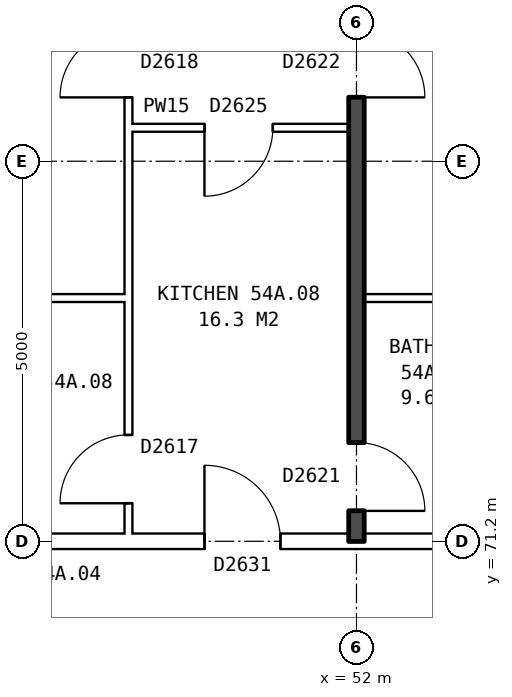
"""IFC4 building model, lengths in metres.
Left out: names, types, materials, properties, quantities, classifications, styles, units other than length and angle.
Written with IfcOpenShell. Run it as: python <this file> out.ifc"""

import sys

from ifc_helpers import new_model, si_unit, direction, frame, frame_2d, origin, place, context, subcontext, project, spatial, rectangle, extrude, element, fill, save


model = new_model("IFC4")
c1 = context("Model", 3, precision=1e-05, world=origin(), true_north=direction((0.0, 1.0)))
c2 = subcontext(c1, "Body", "Model", "MODEL_VIEW")
j1 = project(units=[si_unit("LENGTHUNIT", "METRE"), si_unit("PLANEANGLEUNIT", "RADIAN")], contexts=[c1])
p1 = place(None, origin())
s1 = spatial("IfcSite", under=j1, at=p1, CompositionType="ELEMENT")
p2 = place(p1, origin())
s2 = spatial("IfcBuilding", under=s1, at=p2, CompositionType="ELEMENT")
p3 = place(p2, frame((0.0, 0.0, 191.3)))
s3 = spatial("IfcBuildingStorey", under=s2, at=p3, CompositionType="ELEMENT", Elevation=191.3)
p4 = place(p3, frame((44.36, 71.2, 0.0), z_axis=(0.0, 0.0, 1.0), x_axis=(1.0, 0.0, 0.0)))
e1 = element("IfcWall", 1, at=p4, inside=s3, PredefinedType="PARTITIONING", context=c2, shape_type="SweptSolid", body=[
    extrude(rectangle(XDim=19.28, YDim=0.2, at=frame_2d((9.64, 0.0))), origin(), (0.0, 0.0, 1.0), 2.85),
])
p5 = place(p4, frame((14.64, 0.0, 0.0)))
e2 = element("IfcOpeningElement", 2, at=p5, cuts=e1, PredefinedType="OPENING", context=c2, shape_type="SweptSolid", body=[
    extrude(rectangle(XDim=1.0, YDim=2.1, at=frame_2d((0.5, 1.05))), frame((0.0, 0.11, 0.0), z_axis=(0.0, -1.0, 0.0), x_axis=(1.0, 0.0, 0.0)), (0.0, 0.0, 1.0), 0.22),
])
p6 = place(p4, frame((5.64, 0.0, 0.0)))
e3 = element("IfcOpeningElement", 3, at=p6, cuts=e1, PredefinedType="OPENING", context=c2, shape_type="SweptSolid", body=[
    extrude(rectangle(XDim=1.0, YDim=2.1, at=frame_2d((0.5, 1.05))), frame((0.0, 0.11, 0.0), z_axis=(0.0, -1.0, 0.0), x_axis=(1.0, 0.0, 0.0)), (0.0, 0.0, 1.0), 0.22),
])
p7 = place(p3, frame((46.1, 74.4, 0.0), z_axis=(0.0, 0.0, 1.0), x_axis=(1.0, 0.0, 0.0)))
e4 = element("IfcWall", 4, at=p7, inside=s3, PredefinedType="PARTITIONING", context=c2, shape_type="SweptSolid", body=[
    extrude(rectangle(XDim=2.9, YDim=0.1, at=frame_2d((1.45, 0.0))), origin(), (0.0, 0.0, 1.0), 2.85),
])
p8 = place(p3, frame((52.1, 74.4, 0.0), z_axis=(0.0, 0.0, 1.0), x_axis=(1.0, 0.0, 0.0)))
e5 = element("IfcWall", 5, at=p8, inside=s3, PredefinedType="PARTITIONING", context=c2, shape_type="SweptSolid", body=[
    extrude(rectangle(XDim=5.8, YDim=0.1, at=frame_2d((2.9, 0.0))), origin(), (0.0, 0.0, 1.0), 2.85),
])
p9 = place(p3, frame((49.0, 76.64, 0.0), z_axis=(0.0, 0.0, 1.0), x_axis=(1.0, 0.0, 0.0)))
e6 = element("IfcWall", 6, at=p9, inside=s3, PredefinedType="PARTITIONING", context=c2, shape_type="SweptSolid", body=[
    extrude(rectangle(XDim=2.9, YDim=0.1, at=frame_2d((1.45, 0.0))), origin(), (0.0, 0.0, 1.0), 2.85),
])
p10 = place(p9, frame((1.0, 0.0, 0.0)))
e7 = element("IfcOpeningElement", 7, at=p10, cuts=e6, PredefinedType="OPENING", context=c2, shape_type="SweptSolid", body=[
    extrude(rectangle(XDim=0.9, YDim=2.1, at=frame_2d((0.45, 1.05))), frame((0.0, 0.06, 0.0), z_axis=(0.0, -1.0, 0.0), x_axis=(1.0, 0.0, 0.0)), (0.0, 0.0, 1.0), 0.12),
])
p11 = place(p3, frame((49.0, 71.3, 0.0), z_axis=(0.0, 0.0, 1.0), x_axis=(0.0, 1.0, 0.0)))
e8 = element("IfcWall", 8, at=p11, inside=s3, PredefinedType="PARTITIONING", context=c2, shape_type="SweptSolid", body=[
    extrude(rectangle(XDim=14.34, YDim=0.1, at=frame_2d((7.17, 0.0))), origin(), (0.0, 0.0, 1.0), 2.85),
])
p12 = place(p11, frame((5.74, 0.0, 0.0)))
e9 = element("IfcOpeningElement", 9, at=p12, cuts=e8, PredefinedType="OPENING", context=c2, shape_type="SweptSolid", body=[
    extrude(rectangle(XDim=0.9, YDim=2.1, at=frame_2d((0.45, 1.05))), frame((0.0, 0.06, 0.0), z_axis=(0.0, -1.0, 0.0), x_axis=(1.0, 0.0, 0.0)), (0.0, 0.0, 1.0), 0.12),
])
p13 = place(p11, frame((0.4, 0.0, 0.0)))
e10 = element("IfcOpeningElement", 10, at=p13, cuts=e8, PredefinedType="OPENING", context=c2, shape_type="SweptSolid", body=[
    extrude(rectangle(XDim=0.9, YDim=2.1, at=frame_2d((0.45, 1.05))), frame((0.0, 0.06, 0.0), z_axis=(0.0, -1.0, 0.0), x_axis=(1.0, 0.0, 0.0)), (0.0, 0.0, 1.0), 0.12),
])
p14 = place(p3, frame((52.0, 71.2, 0.0), z_axis=(0.0, 0.0, 1.0), x_axis=(0.0, 1.0, 0.0)))
e11 = element("IfcWall", 11, at=p14, inside=s3, PredefinedType="SOLIDWALL", context=c2, shape_type="SweptSolid", body=[
    extrude(rectangle(XDim=14.44, YDim=0.2, at=frame_2d((7.22, 0.0))), origin(), (0.0, 0.0, 1.0), 2.85),
])
p15 = place(p14, frame((5.84, 0.0, 0.0)))
e12 = element("IfcOpeningElement", 12, at=p15, cuts=e11, PredefinedType="OPENING", context=c2, shape_type="SweptSolid", body=[
    extrude(rectangle(XDim=0.9, YDim=2.1, at=frame_2d((0.45, 1.05))), frame((0.0, 0.11, 0.0), z_axis=(0.0, -1.0, 0.0), x_axis=(1.0, 0.0, 0.0)), (0.0, 0.0, 1.0), 0.22),
])
p16 = place(p14, frame((0.4, 0.0, 0.0)))
e13 = element("IfcOpeningElement", 13, at=p16, cuts=e11, PredefinedType="OPENING", context=c2, shape_type="SweptSolid", body=[
    extrude(rectangle(XDim=0.9, YDim=2.1, at=frame_2d((0.45, 1.05))), frame((0.0, 0.11, 0.0), z_axis=(0.0, -1.0, 0.0), x_axis=(1.0, 0.0, 0.0)), (0.0, 0.0, 1.0), 0.22),
])
p17 = place(p15, frame((0.9, 0.0, 0.0), z_axis=(0.0, 0.0, 1.0), x_axis=(-1.0, 0.0, 0.0)))
e14 = element("IfcDoor", 14, at=p17, inside=s3, OperationType="SINGLE_SWING_RIGHT", PredefinedType="DOOR", context=c2, shape_type="SweptSolid", body=[
    extrude(rectangle(XDim=0.9, YDim=2.1, at=frame_2d((0.45, 1.05))), frame((0.0, 0.025, 0.0), z_axis=(0.0, -1.0, 0.0), x_axis=(1.0, 0.0, 0.0)), (0.0, 0.0, 1.0), 0.05),
])
fill(e12, e14)
p18 = place(p12, origin())
e15 = element("IfcDoor", 15, at=p18, inside=s3, OperationType="SINGLE_SWING_LEFT", PredefinedType="DOOR", context=c2, shape_type="SweptSolid", body=[
    extrude(rectangle(XDim=0.9, YDim=2.1, at=frame_2d((0.45, 1.05))), frame((0.0, 0.025, 0.0), z_axis=(0.0, -1.0, 0.0), x_axis=(1.0, 0.0, 0.0)), (0.0, 0.0, 1.0), 0.05),
])
fill(e9, e15)
p19 = place(p6, origin())
e16 = element("IfcDoor", 16, at=p19, inside=s3, OperationType="SINGLE_SWING_LEFT", PredefinedType="DOOR", context=c2, shape_type="SweptSolid", body=[
    extrude(rectangle(XDim=1.0, YDim=2.1, at=frame_2d((0.5, 1.05))), frame((0.0, 0.025, 0.0), z_axis=(0.0, -1.0, 0.0), x_axis=(1.0, 0.0, 0.0)), (0.0, 0.0, 1.0), 0.05),
])
fill(e3, e16)
p20 = place(p10, frame((0.9, 0.0, 0.0), z_axis=(0.0, 0.0, 1.0), x_axis=(-1.0, 0.0, 0.0)))
e17 = element("IfcDoor", 17, at=p20, inside=s3, OperationType="SINGLE_SWING_RIGHT", PredefinedType="DOOR", context=c2, shape_type="SweptSolid", body=[
    extrude(rectangle(XDim=0.9, YDim=2.1, at=frame_2d((0.45, 1.05))), frame((0.0, 0.025, 0.0), z_axis=(0.0, -1.0, 0.0), x_axis=(1.0, 0.0, 0.0)), (0.0, 0.0, 1.0), 0.05),
])
fill(e7, e17)
p21 = place(p16, frame((0.9, 0.0, 0.0), z_axis=(0.0, 0.0, 1.0), x_axis=(-1.0, 0.0, 0.0)))
e18 = element("IfcDoor", 18, at=p21, inside=s3, OperationType="SINGLE_SWING_RIGHT", PredefinedType="DOOR", context=c2, shape_type="SweptSolid", body=[
    extrude(rectangle(XDim=0.9, YDim=2.1, at=frame_2d((0.45, 1.05))), frame((0.0, 0.025, 0.0), z_axis=(0.0, -1.0, 0.0), x_axis=(1.0, 0.0, 0.0)), (0.0, 0.0, 1.0), 0.05),
])
fill(e13, e18)
p22 = place(p13, origin())
e19 = element("IfcDoor", 19, at=p22, inside=s3, OperationType="SINGLE_SWING_LEFT", PredefinedType="DOOR", context=c2, shape_type="SweptSolid", body=[
    extrude(rectangle(XDim=0.9, YDim=2.1, at=frame_2d((0.45, 1.05))), frame((0.0, 0.025, 0.0), z_axis=(0.0, -1.0, 0.0), x_axis=(1.0, 0.0, 0.0)), (0.0, 0.0, 1.0), 0.05),
])
fill(e10, e19)
save(model, sys.argv[1])
